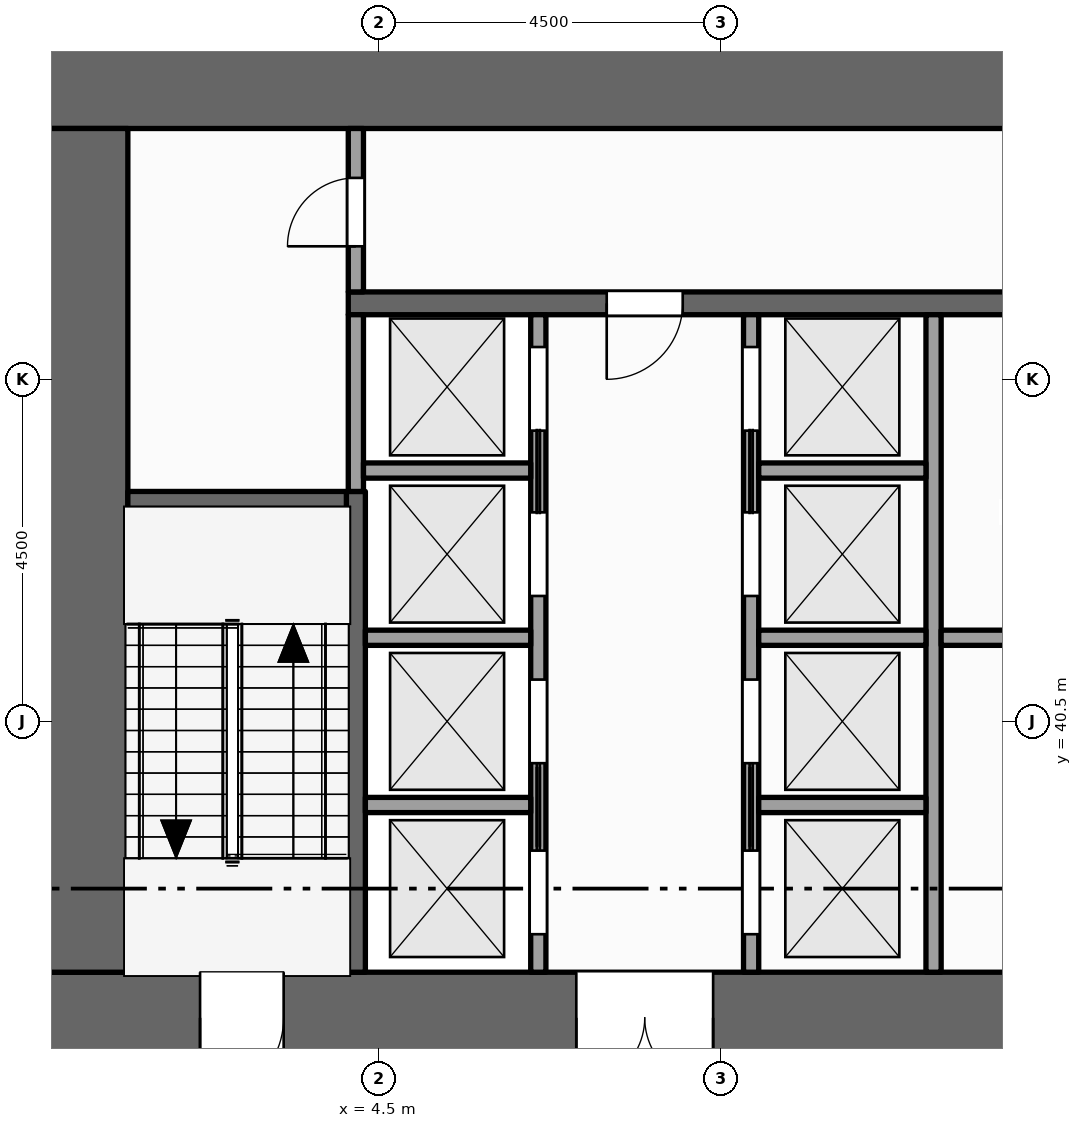
"""IFC4 building model, lengths in metres.
Left out: names, types, materials, properties, quantities, classifications, styles, units other than length and angle.
Written with IfcOpenShell. Run it as: python <this file> out.ifc"""

import sys

from ifc_helpers import new_model, si_unit, direction, frame, frame_2d, origin, place, context, subcontext, project, spatial, rectangle, extrude, element, fill, save


model = new_model("IFC4")
c1 = context("Model", 3, precision=1e-05, world=origin(), true_north=direction((0.0, 1.0)))
c2 = subcontext(c1, "Body", "Model", "MODEL_VIEW")
j1 = project(units=[si_unit("LENGTHUNIT", "METRE"), si_unit("PLANEANGLEUNIT", "RADIAN")], contexts=[c1])
p1 = place(None, origin())
s1 = spatial("IfcSite", under=j1, at=p1, CompositionType="ELEMENT")
p2 = place(p1, origin())
s2 = spatial("IfcBuilding", under=s1, at=p2, CompositionType="ELEMENT")
p3 = place(p2, frame((0.0, 0.0, 131.0)))
s3 = spatial("IfcBuildingStorey", under=s2, at=p3, CompositionType="ELEMENT", Elevation=131.0)
p4 = place(p3, frame((0.0, 36.6, -0.15), z_axis=(0.0, 0.0, 1.0), x_axis=(1.0, 0.0, 0.0)))
e1 = element("IfcWall", 1, at=p4, inside=s3, PredefinedType="SHEAR", context=c2, shape_type="SweptSolid", body=[
    extrude(rectangle(XDim=22.5, YDim=1.2, at=frame_2d((11.25, 0.0))), origin(), (0.0, 0.0, 1.0), 8.0),
])
p5 = place(p4, frame((7.1, 0.0, 0.15)))
e2 = element("IfcOpeningElement", 2, at=p5, cuts=e1, PredefinedType="OPENING", context=c2, shape_type="SweptSolid", body=[
    extrude(rectangle(XDim=1.8, YDim=2.1, at=frame_2d((0.9, 1.05))), frame((0.0, 0.61, 0.0), z_axis=(0.0, -1.0, 0.0), x_axis=(1.0, 0.0, 0.0)), (0.0, 0.0, 1.0), 1.22),
])
p6 = place(p4, frame((13.15, 0.0, 0.15)))
e3 = element("IfcOpeningElement", 3, at=p6, cuts=e1, PredefinedType="OPENING", context=c2, shape_type="SweptSolid", body=[
    extrude(rectangle(XDim=1.1, YDim=2.1, at=frame_2d((0.55, 1.05))), frame((0.0, 0.61, 0.0), z_axis=(0.0, -1.0, 0.0), x_axis=(1.0, 0.0, 0.0)), (0.0, 0.0, 1.0), 1.22),
])
p7 = place(p4, frame((2.15, 0.0, 0.15)))
e4 = element("IfcOpeningElement", 4, at=p7, cuts=e1, PredefinedType="OPENING", context=c2, shape_type="SweptSolid", body=[
    extrude(rectangle(XDim=1.1, YDim=2.1, at=frame_2d((0.55, 1.05))), frame((0.0, 0.61, 0.0), z_axis=(0.0, -1.0, 0.0), x_axis=(1.0, 0.0, 0.0)), (0.0, 0.0, 1.0), 1.22),
])
p8 = place(p4, frame((19.35, 0.0, 0.15)))
e5 = element("IfcOpeningElement", 5, at=p8, cuts=e1, PredefinedType="OPENING", context=c2, shape_type="SweptSolid", body=[
    extrude(rectangle(XDim=1.1, YDim=2.1, at=frame_2d((0.55, 1.05))), frame((0.0, 0.61, 0.0), z_axis=(0.0, -1.0, 0.0), x_axis=(1.0, 0.0, 0.0)), (0.0, 0.0, 1.0), 1.22),
])
p9 = place(p3, frame((0.0, 48.9, -0.15), z_axis=(0.0, 0.0, 1.0), x_axis=(1.0, 0.0, 0.0)))
e6 = element("IfcWall", 6, at=p9, inside=s3, PredefinedType="SHEAR", context=c2, shape_type="SweptSolid", body=[
    extrude(rectangle(XDim=22.5, YDim=1.2, at=frame_2d((11.25, 0.0))), origin(), (0.0, 0.0, 1.0), 8.0),
])
p10 = place(p3, frame((0.6, 37.2, -0.15), z_axis=(0.0, 0.0, 1.0), x_axis=(0.0, 1.0, 0.0)))
e7 = element("IfcWall", 7, at=p10, inside=s3, PredefinedType="SHEAR", context=c2, shape_type="SweptSolid", body=[
    extrude(rectangle(XDim=11.1, YDim=1.2, at=frame_2d((5.55, 0.0))), origin(), (0.0, 0.0, 1.0), 8.0),
])
p11 = place(p3, frame((4.2, 37.2, 0.0), z_axis=(0.0, 0.0, 1.0), x_axis=(0.0, 1.0, 0.0)))
e8 = element("IfcWall", 8, at=p11, inside=s3, PredefinedType="SHEAR", context=c2, shape_type="SweptSolid", body=[
    extrude(rectangle(XDim=6.325, YDim=0.25, at=frame_2d((3.163, 0.0))), origin(), (0.0, 0.0, 1.0), 7.85),
])
p12 = place(p3, frame((4.2, 43.525, 0.0), z_axis=(0.0, 0.0, 1.0), x_axis=(0.0, 1.0, 0.0)))
e9 = element("IfcWall", 9, at=p12, inside=s3, PredefinedType="SOLIDWALL", context=c2, shape_type="SweptSolid", body=[
    extrude(rectangle(XDim=2.325, YDim=0.2, at=frame_2d((1.163, 0.0))), origin(), (0.0, 0.0, 1.0), 7.85),
])
p13 = place(p3, frame((4.2, 46.15, 0.0), z_axis=(0.0, 0.0, 1.0), x_axis=(0.0, 1.0, 0.0)))
e10 = element("IfcWall", 10, at=p13, inside=s3, PredefinedType="PARTITIONING", context=c2, shape_type="SweptSolid", body=[
    extrude(rectangle(XDim=2.15, YDim=0.2, at=frame_2d((1.075, 0.0))), origin(), (0.0, 0.0, 1.0), 7.85),
])
p14 = place(p13, frame((0.6, 0.0, 0.0)))
e11 = element("IfcOpeningElement", 11, at=p14, cuts=e10, PredefinedType="OPENING", context=c2, shape_type="SweptSolid", body=[
    extrude(rectangle(XDim=0.9, YDim=2.1, at=frame_2d((0.45, 1.05))), frame((0.0, 0.11, 0.0), z_axis=(0.0, -1.0, 0.0), x_axis=(1.0, 0.0, 0.0)), (0.0, 0.0, 1.0), 0.22),
])
p15 = place(p3, frame((6.6, 37.2, 0.0), z_axis=(0.0, 0.0, 1.0), x_axis=(0.0, 1.0, 0.0)))
e12 = element("IfcWall", 12, at=p15, inside=s3, PredefinedType="SOLIDWALL", context=c2, shape_type="SweptSolid", body=[
    extrude(rectangle(XDim=8.65, YDim=0.2, at=frame_2d((4.325, 0.0))), origin(), (0.0, 0.0, 1.0), 7.85),
])
p16 = place(p15, frame((0.5, 0.0, 0.012)))
e13 = element("IfcOpeningElement", 13, at=p16, cuts=e12, PredefinedType="OPENING", context=c2, shape_type="SweptSolid", body=[
    extrude(rectangle(XDim=1.1, YDim=2.1, at=frame_2d((0.55, 1.05))), frame((0.0, 0.11, 0.0), z_axis=(0.0, -1.0, 0.0), x_axis=(1.0, 0.0, 0.0)), (0.0, 0.0, 1.0), 0.22),
])
p17 = place(p15, frame((2.75, 0.0, 0.012)))
e14 = element("IfcOpeningElement", 14, at=p17, cuts=e12, PredefinedType="OPENING", context=c2, shape_type="SweptSolid", body=[
    extrude(rectangle(XDim=1.1, YDim=2.1, at=frame_2d((0.55, 1.05))), frame((0.0, 0.11, 0.0), z_axis=(0.0, -1.0, 0.0), x_axis=(1.0, 0.0, 0.0)), (0.0, 0.0, 1.0), 0.22),
])
p18 = place(p15, frame((4.95, 0.0, 0.012)))
e15 = element("IfcOpeningElement", 15, at=p18, cuts=e12, PredefinedType="OPENING", context=c2, shape_type="SweptSolid", body=[
    extrude(rectangle(XDim=1.1, YDim=2.1, at=frame_2d((0.55, 1.05))), frame((0.0, 0.11, 0.0), z_axis=(0.0, -1.0, 0.0), x_axis=(1.0, 0.0, 0.0)), (0.0, 0.0, 1.0), 0.22),
])
p19 = place(p15, frame((7.125, 0.0, 0.012)))
e16 = element("IfcOpeningElement", 16, at=p19, cuts=e12, PredefinedType="OPENING", context=c2, shape_type="SweptSolid", body=[
    extrude(rectangle(XDim=1.1, YDim=2.1, at=frame_2d((0.55, 1.05))), frame((0.0, 0.11, 0.0), z_axis=(0.0, -1.0, 0.0), x_axis=(1.0, 0.0, 0.0)), (0.0, 0.0, 1.0), 0.22),
])
p20 = place(p3, frame((9.4, 37.2, 0.0), z_axis=(0.0, 0.0, 1.0), x_axis=(0.0, 1.0, 0.0)))
e17 = element("IfcWall", 17, at=p20, inside=s3, PredefinedType="SOLIDWALL", context=c2, shape_type="SweptSolid", body=[
    extrude(rectangle(XDim=8.65, YDim=0.2, at=frame_2d((4.325, 0.0))), origin(), (0.0, 0.0, 1.0), 7.85),
])
p21 = place(p20, frame((0.5, 0.0, 0.012)))
e18 = element("IfcOpeningElement", 18, at=p21, cuts=e17, PredefinedType="OPENING", context=c2, shape_type="SweptSolid", body=[
    extrude(rectangle(XDim=1.1, YDim=2.1, at=frame_2d((0.55, 1.05))), frame((0.0, 0.11, 0.0), z_axis=(0.0, -1.0, 0.0), x_axis=(1.0, 0.0, 0.0)), (0.0, 0.0, 1.0), 0.22),
])
p22 = place(p20, frame((2.75, 0.0, 0.012)))
e19 = element("IfcOpeningElement", 19, at=p22, cuts=e17, PredefinedType="OPENING", context=c2, shape_type="SweptSolid", body=[
    extrude(rectangle(XDim=1.1, YDim=2.1, at=frame_2d((0.55, 1.05))), frame((0.0, 0.11, 0.0), z_axis=(0.0, -1.0, 0.0), x_axis=(1.0, 0.0, 0.0)), (0.0, 0.0, 1.0), 0.22),
])
p23 = place(p20, frame((4.95, 0.0, 0.012)))
e20 = element("IfcOpeningElement", 20, at=p23, cuts=e17, PredefinedType="OPENING", context=c2, shape_type="SweptSolid", body=[
    extrude(rectangle(XDim=1.1, YDim=2.1, at=frame_2d((0.55, 1.05))), frame((0.0, 0.11, 0.0), z_axis=(0.0, -1.0, 0.0), x_axis=(1.0, 0.0, 0.0)), (0.0, 0.0, 1.0), 0.22),
])
p24 = place(p20, frame((7.125, 0.0, 0.012)))
e21 = element("IfcOpeningElement", 21, at=p24, cuts=e17, PredefinedType="OPENING", context=c2, shape_type="SweptSolid", body=[
    extrude(rectangle(XDim=1.1, YDim=2.1, at=frame_2d((0.55, 1.05))), frame((0.0, 0.11, 0.0), z_axis=(0.0, -1.0, 0.0), x_axis=(1.0, 0.0, 0.0)), (0.0, 0.0, 1.0), 0.22),
])
p25 = place(p3, frame((11.8, 37.2, 0.0), z_axis=(0.0, 0.0, 1.0), x_axis=(0.0, 1.0, 0.0)))
e22 = element("IfcWall", 22, at=p25, inside=s3, PredefinedType="SOLIDWALL", context=c2, shape_type="SweptSolid", body=[
    extrude(rectangle(XDim=8.65, YDim=0.2, at=frame_2d((4.325, 0.0))), origin(), (0.0, 0.0, 1.0), 7.85),
])
p26 = place(p3, frame((4.325, 39.4, 0.0), z_axis=(0.0, 0.0, 1.0), x_axis=(1.0, 0.0, 0.0)))
e23 = element("IfcWall", 23, at=p26, inside=s3, PredefinedType="SOLIDWALL", context=c2, shape_type="SweptSolid", body=[
    extrude(rectangle(XDim=2.175, YDim=0.2, at=frame_2d((1.087, 0.0))), origin(), (0.0, 0.0, 1.0), 7.85),
])
p27 = place(p3, frame((9.5, 39.4, 0.0), z_axis=(0.0, 0.0, 1.0), x_axis=(1.0, 0.0, 0.0)))
e24 = element("IfcWall", 24, at=p27, inside=s3, PredefinedType="SOLIDWALL", context=c2, shape_type="SweptSolid", body=[
    extrude(rectangle(XDim=2.2, YDim=0.2, at=frame_2d((1.1, 0.0))), origin(), (0.0, 0.0, 1.0), 7.85),
])
p28 = place(p3, frame((4.325, 41.6, 0.0), z_axis=(0.0, 0.0, 1.0), x_axis=(1.0, 0.0, 0.0)))
e25 = element("IfcWall", 25, at=p28, inside=s3, PredefinedType="SOLIDWALL", context=c2, shape_type="SweptSolid", body=[
    extrude(rectangle(XDim=2.175, YDim=0.2, at=frame_2d((1.087, 0.0))), origin(), (0.0, 0.0, 1.0), 7.85),
])
p29 = place(p3, frame((9.5, 41.6, 0.0), z_axis=(0.0, 0.0, 1.0), x_axis=(1.0, 0.0, 0.0)))
e26 = element("IfcWall", 26, at=p29, inside=s3, PredefinedType="SOLIDWALL", context=c2, shape_type="SweptSolid", body=[
    extrude(rectangle(XDim=2.2, YDim=0.2, at=frame_2d((1.1, 0.0))), origin(), (0.0, 0.0, 1.0), 7.85),
])
p30 = place(p3, frame((11.9, 41.6, 0.0), z_axis=(0.0, 0.0, 1.0), x_axis=(1.0, 0.0, 0.0)))
e27 = element("IfcWall", 27, at=p30, inside=s3, PredefinedType="PARTITIONING", context=c2, shape_type="SweptSolid", body=[
    extrude(rectangle(XDim=3.6, YDim=0.2, at=frame_2d((1.8, 0.0))), origin(), (0.0, 0.0, 1.0), 7.85),
])
p31 = place(p30, frame((1.3, 0.0, 0.0)))
e28 = element("IfcOpeningElement", 28, at=p31, cuts=e27, PredefinedType="OPENING", context=c2, shape_type="SweptSolid", body=[
    extrude(rectangle(XDim=1.0, YDim=2.1, at=frame_2d((0.5, 1.05))), frame((0.0, 0.11, 0.0), z_axis=(0.0, -1.0, 0.0), x_axis=(1.0, 0.0, 0.0)), (0.0, 0.0, 1.0), 0.22),
])
p32 = place(p3, frame((1.2, 43.4, 0.0), z_axis=(0.0, 0.0, 1.0), x_axis=(1.0, 0.0, 0.0)))
e29 = element("IfcWall", 29, at=p32, inside=s3, PredefinedType="SHEAR", context=c2, shape_type="SweptSolid", body=[
    extrude(rectangle(XDim=2.875, YDim=0.25, at=frame_2d((1.438, 0.0))), origin(), (0.0, 0.0, 1.0), 7.85),
])
for number, where, z_axis, x_axis in (
    (30, (4.3, 43.8, 0.0), (0.0, 0.0, 1.0), (1.0, 0.0, 0.0)),
    (31, (9.5, 43.8, 0.0), (0.0, 0.0, 1.0), (1.0, 0.0, 0.0)),
):
    element("IfcWall", number, at=place(p3, frame(where, z_axis=z_axis, x_axis=x_axis)), inside=s3, PredefinedType="SOLIDWALL", context=c2, shape_type="SweptSolid", body=[
        extrude(rectangle(XDim=2.2, YDim=0.2, at=frame_2d((1.1, 0.0))), origin(), (0.0, 0.0, 1.0), 7.85),
    ])
p33 = place(p3, frame((4.1, 46.0, 0.0), z_axis=(0.0, 0.0, 1.0), x_axis=(1.0, 0.0, 0.0)))
e32 = element("IfcWall", 32, at=p33, inside=s3, PredefinedType="SHEAR", context=c2, shape_type="SweptSolid", body=[
    extrude(rectangle(XDim=14.5, YDim=0.3, at=frame_2d((7.25, 0.0))), origin(), (0.0, 0.0, 1.0), 7.85),
])
p34 = place(p33, frame((3.4, 0.0, 0.0)))
e33 = element("IfcOpeningElement", 33, at=p34, cuts=e32, PredefinedType="OPENING", context=c2, shape_type="SweptSolid", body=[
    extrude(rectangle(XDim=1.0, YDim=2.1, at=frame_2d((0.5, 1.05))), frame((0.0, 0.16, 0.0), z_axis=(0.0, -1.0, 0.0), x_axis=(1.0, 0.0, 0.0)), (0.0, 0.0, 1.0), 0.32),
])
p35 = place(p33, frame((9.1, 0.0, 0.0)))
e34 = element("IfcOpeningElement", 34, at=p35, cuts=e32, PredefinedType="OPENING", context=c2, shape_type="SweptSolid", body=[
    extrude(rectangle(XDim=1.0, YDim=2.1, at=frame_2d((0.5, 1.05))), frame((0.0, 0.16, 0.0), z_axis=(0.0, -1.0, 0.0), x_axis=(1.0, 0.0, 0.0)), (0.0, 0.0, 1.0), 0.32),
])
p36 = place(p16, origin())
e35 = element("IfcDoor", 35, at=p36, inside=s3, OperationType="SLIDING_TO_RIGHT", PredefinedType="DOOR", context=c2, shape_type="SweptSolid", body=[
    extrude(rectangle(XDim=1.1, YDim=2.1, at=frame_2d((0.55, 1.05))), frame((0.0, 0.025, 0.0), z_axis=(0.0, -1.0, 0.0), x_axis=(1.0, 0.0, 0.0)), (0.0, 0.0, 1.0), 0.05),
])
fill(e13, e35)
p37 = place(p17, origin())
e36 = element("IfcDoor", 36, at=p37, inside=s3, OperationType="SLIDING_TO_LEFT", PredefinedType="DOOR", context=c2, shape_type="SweptSolid", body=[
    extrude(rectangle(XDim=1.1, YDim=2.1, at=frame_2d((0.55, 1.05))), frame((0.0, 0.025, 0.0), z_axis=(0.0, -1.0, 0.0), x_axis=(1.0, 0.0, 0.0)), (0.0, 0.0, 1.0), 0.05),
])
fill(e14, e36)
p38 = place(p18, origin())
e37 = element("IfcDoor", 37, at=p38, inside=s3, OperationType="SLIDING_TO_RIGHT", PredefinedType="DOOR", context=c2, shape_type="SweptSolid", body=[
    extrude(rectangle(XDim=1.1, YDim=2.1, at=frame_2d((0.55, 1.05))), frame((0.0, 0.025, 0.0), z_axis=(0.0, -1.0, 0.0), x_axis=(1.0, 0.0, 0.0)), (0.0, 0.0, 1.0), 0.05),
])
fill(e15, e37)
p39 = place(p19, origin())
e38 = element("IfcDoor", 38, at=p39, inside=s3, OperationType="SLIDING_TO_LEFT", PredefinedType="DOOR", context=c2, shape_type="SweptSolid", body=[
    extrude(rectangle(XDim=1.1, YDim=2.1, at=frame_2d((0.55, 1.05))), frame((0.0, 0.025, 0.0), z_axis=(0.0, -1.0, 0.0), x_axis=(1.0, 0.0, 0.0)), (0.0, 0.0, 1.0), 0.05),
])
fill(e16, e38)
p40 = place(p21, origin())
e39 = element("IfcDoor", 39, at=p40, inside=s3, OperationType="SLIDING_TO_RIGHT", PredefinedType="DOOR", context=c2, shape_type="SweptSolid", body=[
    extrude(rectangle(XDim=1.1, YDim=2.1, at=frame_2d((0.55, 1.05))), frame((0.0, 0.025, 0.0), z_axis=(0.0, -1.0, 0.0), x_axis=(1.0, 0.0, 0.0)), (0.0, 0.0, 1.0), 0.05),
])
fill(e18, e39)
p41 = place(p22, origin())
e40 = element("IfcDoor", 40, at=p41, inside=s3, OperationType="SLIDING_TO_LEFT", PredefinedType="DOOR", context=c2, shape_type="SweptSolid", body=[
    extrude(rectangle(XDim=1.1, YDim=2.1, at=frame_2d((0.55, 1.05))), frame((0.0, 0.025, 0.0), z_axis=(0.0, -1.0, 0.0), x_axis=(1.0, 0.0, 0.0)), (0.0, 0.0, 1.0), 0.05),
])
fill(e19, e40)
p42 = place(p23, origin())
e41 = element("IfcDoor", 41, at=p42, inside=s3, OperationType="SLIDING_TO_RIGHT", PredefinedType="DOOR", context=c2, shape_type="SweptSolid", body=[
    extrude(rectangle(XDim=1.1, YDim=2.1, at=frame_2d((0.55, 1.05))), frame((0.0, 0.025, 0.0), z_axis=(0.0, -1.0, 0.0), x_axis=(1.0, 0.0, 0.0)), (0.0, 0.0, 1.0), 0.05),
])
fill(e20, e41)
p43 = place(p24, origin())
e42 = element("IfcDoor", 42, at=p43, inside=s3, OperationType="SLIDING_TO_LEFT", PredefinedType="DOOR", context=c2, shape_type="SweptSolid", body=[
    extrude(rectangle(XDim=1.1, YDim=2.1, at=frame_2d((0.55, 1.05))), frame((0.0, 0.025, 0.0), z_axis=(0.0, -1.0, 0.0), x_axis=(1.0, 0.0, 0.0)), (0.0, 0.0, 1.0), 0.05),
])
fill(e21, e42)
p44 = place(p5, origin())
e43 = element("IfcDoor", 43, at=p44, inside=s3, OperationType="DOUBLE_DOOR_SINGLE_SWING", PredefinedType="DOOR", context=c2, shape_type="SweptSolid", body=[
    extrude(rectangle(XDim=1.8, YDim=2.1, at=frame_2d((0.9, 1.05))), frame((0.0, 0.025, 0.0), z_axis=(0.0, -1.0, 0.0), x_axis=(1.0, 0.0, 0.0)), (0.0, 0.0, 1.0), 0.05),
])
fill(e2, e43)
p45 = place(p34, origin())
e44 = element("IfcDoor", 44, at=p45, inside=s3, OperationType="SINGLE_SWING_LEFT", PredefinedType="DOOR", context=c2, shape_type="SweptSolid", body=[
    extrude(rectangle(XDim=1.0, YDim=2.1, at=frame_2d((0.5, 1.05))), frame((0.0, 0.025, 0.0), z_axis=(0.0, -1.0, 0.0), x_axis=(1.0, 0.0, 0.0)), (0.0, 0.0, 1.0), 0.05),
])
fill(e33, e44)
p46 = place(p7, origin())
e45 = element("IfcDoor", 45, at=p46, inside=s3, OperationType="SINGLE_SWING_LEFT", PredefinedType="DOOR", context=c2, shape_type="SweptSolid", body=[
    extrude(rectangle(XDim=1.1, YDim=2.1, at=frame_2d((0.55, 1.05))), frame((0.0, 0.025, 0.0), z_axis=(0.0, -1.0, 0.0), x_axis=(1.0, 0.0, 0.0)), (0.0, 0.0, 1.0), 0.05),
])
fill(e4, e45)
p47 = place(p14, origin())
e46 = element("IfcDoor", 46, at=p47, inside=s3, OperationType="SINGLE_SWING_LEFT", PredefinedType="DOOR", context=c2, shape_type="SweptSolid", body=[
    extrude(rectangle(XDim=0.9, YDim=2.1, at=frame_2d((0.45, 1.05))), frame((0.0, 0.025, 0.0), z_axis=(0.0, -1.0, 0.0), x_axis=(1.0, 0.0, 0.0)), (0.0, 0.0, 1.0), 0.05),
])
fill(e11, e46)
save(model, sys.argv[1])
